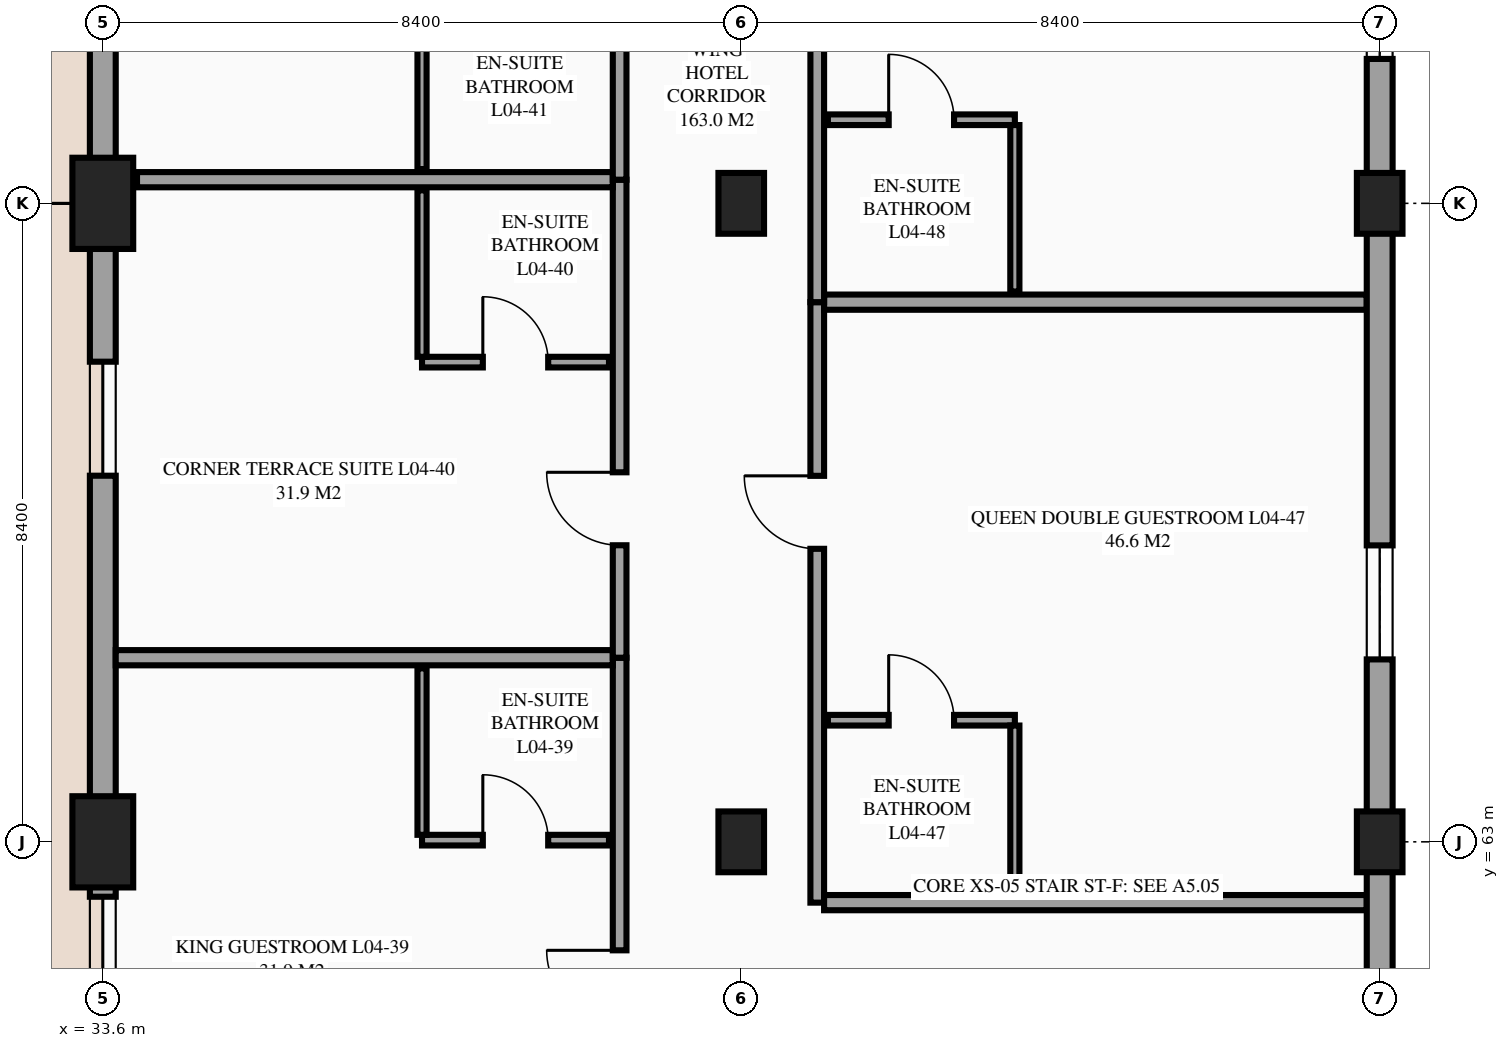
"""IFC4 building model, lengths in metres.
Left out: names, types, materials, properties, quantities, classifications, styles, units other than length and angle.
Written with IfcOpenShell. Run it as: python <this file> out.ifc"""

import sys

from ifc_helpers import new_model, si_unit, direction, frame, frame_2d, origin, origin_2d, place, context, subcontext, project, spatial, rectangle, extrude, element, fill, save


model = new_model("IFC4")
c1 = context("Model", 3, precision=1e-05, world=origin(), true_north=direction((0.0, 1.0)))
c2 = subcontext(c1, "Body", "Model", "MODEL_VIEW")
j1 = project(units=[si_unit("LENGTHUNIT", "METRE"), si_unit("PLANEANGLEUNIT", "RADIAN")], contexts=[c1])
p1 = place(None, origin())
s1 = spatial("IfcSite", under=j1, at=p1, CompositionType="ELEMENT")
p2 = place(p1, origin())
s2 = spatial("IfcBuilding", under=s1, at=p2, CompositionType="ELEMENT")
p3 = place(p2, frame((0.0, 0.0, 18.3)))
s3 = spatial("IfcBuildingStorey", under=s2, at=p3, CompositionType="ELEMENT", Elevation=18.3)
for number, where, z_axis, x_axis in (
    (1, (33.6, 63.0, 0.0), (0.0, 0.0, 1.0), (1.0, 0.0, 0.0)),
    (2, (33.6, 71.4, 0.0), (0.0, 0.0, 1.0), (1.0, 0.0, 0.0)),
):
    element("IfcColumn", number, at=place(p3, frame(where, z_axis=z_axis, x_axis=x_axis)), inside=s3, PredefinedType="COLUMN", context=c2, shape_type="SweptSolid", body=[
        extrude(rectangle(XDim=0.8, YDim=1.2, at=origin_2d()), origin(), (0.0, 0.0, 1.0), 3.6),
    ])
for number, where, z_axis, x_axis in (
    (3, (42.0, 63.0, 0.0), (0.0, 0.0, 1.0), (1.0, 0.0, 0.0)),
    (4, (42.0, 71.4, 0.0), (0.0, 0.0, 1.0), (1.0, 0.0, 0.0)),
    (5, (50.4, 63.0, 0.0), (0.0, 0.0, 1.0), (1.0, 0.0, 0.0)),
    (6, (50.4, 71.4, 0.0), (0.0, 0.0, 1.0), (1.0, 0.0, 0.0)),
):
    element("IfcColumn", number, at=place(p3, frame(where, z_axis=z_axis, x_axis=x_axis)), inside=s3, PredefinedType="COLUMN", context=c2, shape_type="SweptSolid", body=[
        extrude(rectangle(XDim=0.6, YDim=0.8, at=origin_2d()), origin(), (0.0, 0.0, 1.0), 3.6),
    ])
p4 = place(p3, frame((50.4, 71.4, 0.0), z_axis=(0.0, 0.0, 1.0), x_axis=(0.0, 1.0, 0.0)))
e7 = element("IfcWall", 7, at=p4, inside=s3, PredefinedType="STANDARD", context=c2, shape_type="SweptSolid", body=[
    extrude(rectangle(XDim=8.4, YDim=0.34, at=frame_2d((4.2, 0.0))), origin(), (0.0, 0.0, 1.0), 3.133),
])
p5 = place(p4, frame((1.9, 0.0, 0.85)))
e8 = element("IfcOpeningElement", 8, at=p5, cuts=e7, PredefinedType="OPENING", context=c2, shape_type="SweptSolid", body=[
    extrude(rectangle(XDim=1.5, YDim=1.5, at=frame_2d((0.75, 0.75))), frame((0.0, 0.18, 0.0), z_axis=(0.0, -1.0, 0.0), x_axis=(1.0, 0.0, 0.0)), (0.0, 0.0, 1.0), 0.36),
])
p6 = place(p3, frame((33.6, 79.8, 0.0), z_axis=(0.0, 0.0, 1.0), x_axis=(0.0, -1.0, 0.0)))
e9 = element("IfcWall", 9, at=p6, inside=s3, PredefinedType="STANDARD", context=c2, shape_type="SweptSolid", body=[
    extrude(rectangle(XDim=16.8, YDim=0.34, at=frame_2d((8.4, 0.0))), origin(), (0.0, 0.0, 1.0), 2.53),
])
p7 = place(p6, frame((10.483, 0.0, 0.85)))
e10 = element("IfcOpeningElement", 10, at=p7, cuts=e9, PredefinedType="OPENING", context=c2, shape_type="SweptSolid", body=[
    extrude(rectangle(XDim=1.5, YDim=1.5, at=frame_2d((0.75, 0.75))), frame((0.0, 0.18, 0.0), z_axis=(0.0, -1.0, 0.0), x_axis=(1.0, 0.0, 0.0)), (0.0, 0.0, 1.0), 0.36),
])
p8 = place(p6, frame((4.344, 0.0, 0.85)))
e11 = element("IfcOpeningElement", 11, at=p8, cuts=e9, PredefinedType="OPENING", context=c2, shape_type="SweptSolid", body=[
    extrude(rectangle(XDim=1.2, YDim=1.5, at=frame_2d((0.6, 0.75))), frame((0.0, 0.18, 0.0), z_axis=(0.0, -1.0, 0.0), x_axis=(1.0, 0.0, 0.0)), (0.0, 0.0, 1.0), 0.36),
])
p9 = place(p3, frame((40.4, 59.133, 0.0), z_axis=(0.0, 0.0, 1.0), x_axis=(0.0, 1.0, 0.0)))
e12 = element("IfcWall", 12, at=p9, inside=s3, PredefinedType="PARTITIONING", context=c2, shape_type="SweptSolid", body=[
    extrude(rectangle(XDim=6.289, YDim=0.18, at=frame_2d((3.145, 0.0))), origin(), (0.0, 0.0, 1.0), 3.375),
])
p10 = place(p9, frame((1.479, 0.0, 0.0)))
e13 = element("IfcOpeningElement", 13, at=p10, cuts=e12, PredefinedType="OPENING", context=c2, shape_type="SweptSolid", body=[
    extrude(rectangle(XDim=0.96, YDim=2.15, at=frame_2d((0.48, 1.075))), frame((0.0, 0.1, 0.0), z_axis=(0.0, -1.0, 0.0), x_axis=(1.0, 0.0, 0.0)), (0.0, 0.0, 1.0), 0.2),
])
p11 = place(p3, frame((33.77, 65.422, 0.0), z_axis=(0.0, 0.0, 1.0), x_axis=(1.0, 0.0, 0.0)))
e14 = element("IfcWall", 14, at=p11, inside=s3, PredefinedType="PARTITIONING", context=c2, shape_type="SweptSolid", body=[
    extrude(rectangle(XDim=6.54, YDim=0.2, at=frame_2d((3.27, 0.0))), origin(), (0.0, 0.0, 1.0), 3.375),
])
p12 = place(p3, frame((37.8, 63.022, 0.0), z_axis=(0.0, 0.0, 1.0), x_axis=(1.0, 0.0, 0.0)))
e15 = element("IfcWall", 15, at=p12, inside=s3, PredefinedType="PARTITIONING", context=c2, shape_type="SweptSolid", body=[
    extrude(rectangle(XDim=2.46, YDim=0.14, at=frame_2d((1.23, 0.0))), origin(), (0.0, 0.0, 1.0), 2.63),
])
p13 = place(p12, frame((0.8, 0.0, 0.0)))
e16 = element("IfcOpeningElement", 16, at=p13, cuts=e15, PredefinedType="OPENING", context=c2, shape_type="SweptSolid", body=[
    extrude(rectangle(XDim=0.86, YDim=2.1, at=frame_2d((0.43, 1.05))), frame((0.0, 0.08, 0.0), z_axis=(0.0, -1.0, 0.0), x_axis=(1.0, 0.0, 0.0)), (0.0, 0.0, 1.0), 0.16),
])
p14 = place(p3, frame((37.8, 63.092, 0.0), z_axis=(0.0, 0.0, 1.0), x_axis=(0.0, 1.0, 0.0)))
e17 = element("IfcWall", 17, at=p14, inside=s3, PredefinedType="PARTITIONING", context=c2, shape_type="SweptSolid", body=[
    extrude(rectangle(XDim=2.19, YDim=0.12, at=frame_2d((1.095, 0.0))), origin(), (0.0, 0.0, 1.0), 3.375),
])
p15 = place(p3, frame((40.4, 65.422, 0.0), z_axis=(0.0, 0.0, 1.0), x_axis=(0.0, 1.0, 0.0)))
e18 = element("IfcWall", 18, at=p15, inside=s3, PredefinedType="PARTITIONING", context=c2, shape_type="SweptSolid", body=[
    extrude(rectangle(XDim=6.289, YDim=0.18, at=frame_2d((3.145, 0.0))), origin(), (0.0, 0.0, 1.0), 3.375),
])
p16 = place(p15, frame((1.479, 0.0, 0.0)))
e19 = element("IfcOpeningElement", 19, at=p16, cuts=e18, PredefinedType="OPENING", context=c2, shape_type="SweptSolid", body=[
    extrude(rectangle(XDim=0.96, YDim=2.15, at=frame_2d((0.48, 1.075))), frame((0.0, 0.1, 0.0), z_axis=(0.0, -1.0, 0.0), x_axis=(1.0, 0.0, 0.0)), (0.0, 0.0, 1.0), 0.2),
])
p17 = place(p3, frame((34.05, 71.711, 0.0), z_axis=(0.0, 0.0, 1.0), x_axis=(1.0, 0.0, 0.0)))
e20 = element("IfcWall", 20, at=p17, inside=s3, PredefinedType="PARTITIONING", context=c2, shape_type="SweptSolid", body=[
    extrude(rectangle(XDim=6.26, YDim=0.2, at=frame_2d((3.13, 0.0))), origin(), (0.0, 0.0, 1.0), 3.375),
])
p18 = place(p3, frame((37.8, 69.311, 0.0), z_axis=(0.0, 0.0, 1.0), x_axis=(1.0, 0.0, 0.0)))
e21 = element("IfcWall", 21, at=p18, inside=s3, PredefinedType="PARTITIONING", context=c2, shape_type="SweptSolid", body=[
    extrude(rectangle(XDim=2.46, YDim=0.14, at=frame_2d((1.23, 0.0))), origin(), (0.0, 0.0, 1.0), 3.375),
])
p19 = place(p18, frame((0.8, 0.0, 0.0)))
e22 = element("IfcOpeningElement", 22, at=p19, cuts=e21, PredefinedType="OPENING", context=c2, shape_type="SweptSolid", body=[
    extrude(rectangle(XDim=0.86, YDim=2.1, at=frame_2d((0.43, 1.05))), frame((0.0, 0.08, 0.0), z_axis=(0.0, -1.0, 0.0), x_axis=(1.0, 0.0, 0.0)), (0.0, 0.0, 1.0), 0.16),
])
p20 = place(p3, frame((37.8, 69.381, 0.0), z_axis=(0.0, 0.0, 1.0), x_axis=(0.0, 1.0, 0.0)))
e23 = element("IfcWall", 23, at=p20, inside=s3, PredefinedType="PARTITIONING", context=c2, shape_type="SweptSolid", body=[
    extrude(rectangle(XDim=2.19, YDim=0.12, at=frame_2d((1.095, 0.0))), origin(), (0.0, 0.0, 1.0), 3.375),
])
p21 = place(p3, frame((40.4, 71.711, 0.0), z_axis=(0.0, 0.0, 1.0), x_axis=(0.0, 1.0, 0.0)))
e24 = element("IfcWall", 24, at=p21, inside=s3, PredefinedType="PARTITIONING", context=c2, shape_type="SweptSolid", body=[
    extrude(rectangle(XDim=6.289, YDim=0.18, at=frame_2d((3.145, 0.0))), origin(), (0.0, 0.0, 1.0), 3.375),
])
p22 = place(p21, frame((3.849, 0.0, 0.0)))
e25 = element("IfcOpeningElement", 25, at=p22, cuts=e24, PredefinedType="OPENING", context=c2, shape_type="SweptSolid", body=[
    extrude(rectangle(XDim=0.96, YDim=2.15, at=frame_2d((0.48, 1.075))), frame((0.0, 0.1, 0.0), z_axis=(0.0, -1.0, 0.0), x_axis=(1.0, 0.0, 0.0)), (0.0, 0.0, 1.0), 0.2),
])
p23 = place(p3, frame((37.8, 71.851, 0.0), z_axis=(0.0, 0.0, 1.0), x_axis=(0.0, 1.0, 0.0)))
e26 = element("IfcWall", 26, at=p23, inside=s3, PredefinedType="PARTITIONING", context=c2, shape_type="SweptSolid", body=[
    extrude(rectangle(XDim=2.19, YDim=0.12, at=frame_2d((1.095, 0.0))), origin(), (0.0, 0.0, 1.0), 3.375),
])
p24 = place(p3, frame((43.0, 62.2, 0.0), z_axis=(0.0, 0.0, 1.0), x_axis=(0.0, 1.0, 0.0)))
e27 = element("IfcWall", 27, at=p24, inside=s3, PredefinedType="PARTITIONING", context=c2, shape_type="SweptSolid", body=[
    extrude(rectangle(XDim=7.9, YDim=0.18, at=frame_2d((3.95, 0.0))), origin(), (0.0, 0.0, 1.0), 3.375),
])
p25 = place(p24, frame((4.655, 0.0, 0.0)))
e28 = element("IfcOpeningElement", 28, at=p25, cuts=e27, PredefinedType="OPENING", context=c2, shape_type="SweptSolid", body=[
    extrude(rectangle(XDim=0.96, YDim=2.15, at=frame_2d((0.48, 1.075))), frame((0.0, 0.1, 0.0), z_axis=(0.0, -1.0, 0.0), x_axis=(1.0, 0.0, 0.0)), (0.0, 0.0, 1.0), 0.2),
])
for number, where, z_axis, x_axis in (
    (29, (43.09, 62.2, 0.0), (0.0, 0.0, 1.0), (1.0, 0.0, 0.0)),
    (30, (43.09, 70.1, 0.0), (0.0, 0.0, 1.0), (1.0, 0.0, 0.0)),
):
    element("IfcWall", number, at=place(p3, frame(where, z_axis=z_axis, x_axis=x_axis)), inside=s3, PredefinedType="PARTITIONING", context=c2, shape_type="SweptSolid", body=[
        extrude(rectangle(XDim=7.14, YDim=0.2, at=frame_2d((3.57, 0.0))), origin(), (0.0, 0.0, 1.0), 3.375),
    ])
p26 = place(p3, frame((43.14, 64.6, 0.0), z_axis=(0.0, 0.0, 1.0), x_axis=(1.0, 0.0, 0.0)))
e31 = element("IfcWall", 31, at=p26, inside=s3, PredefinedType="PARTITIONING", context=c2, shape_type="SweptSolid", body=[
    extrude(rectangle(XDim=2.46, YDim=0.14, at=frame_2d((1.23, 0.0))), origin(), (0.0, 0.0, 1.0), 3.375),
])
p27 = place(p26, frame((0.8, 0.0, 0.0)))
e32 = element("IfcOpeningElement", 32, at=p27, cuts=e31, PredefinedType="OPENING", context=c2, shape_type="SweptSolid", body=[
    extrude(rectangle(XDim=0.86, YDim=2.1, at=frame_2d((0.43, 1.05))), frame((0.0, 0.08, 0.0), z_axis=(0.0, -1.0, 0.0), x_axis=(1.0, 0.0, 0.0)), (0.0, 0.0, 1.0), 0.16),
])
p28 = place(p3, frame((45.6, 62.34, 0.0), z_axis=(0.0, 0.0, 1.0), x_axis=(0.0, 1.0, 0.0)))
e33 = element("IfcWall", 33, at=p28, inside=s3, PredefinedType="PARTITIONING", context=c2, shape_type="SweptSolid", body=[
    extrude(rectangle(XDim=2.19, YDim=0.12, at=frame_2d((1.095, 0.0))), origin(), (0.0, 0.0, 1.0), 3.375),
])
p29 = place(p3, frame((43.0, 70.1, 0.0), z_axis=(0.0, 0.0, 1.0), x_axis=(0.0, 1.0, 0.0)))
e34 = element("IfcWall", 34, at=p29, inside=s3, PredefinedType="PARTITIONING", context=c2, shape_type="SweptSolid", body=[
    extrude(rectangle(XDim=7.9, YDim=0.18, at=frame_2d((3.95, 0.0))), origin(), (0.0, 0.0, 1.0), 3.375),
])
p30 = place(p29, frame((4.655, 0.0, 0.0)))
e35 = element("IfcOpeningElement", 35, at=p30, cuts=e34, PredefinedType="OPENING", context=c2, shape_type="SweptSolid", body=[
    extrude(rectangle(XDim=0.96, YDim=2.15, at=frame_2d((0.48, 1.075))), frame((0.0, 0.1, 0.0), z_axis=(0.0, -1.0, 0.0), x_axis=(1.0, 0.0, 0.0)), (0.0, 0.0, 1.0), 0.2),
])
p31 = place(p3, frame((43.14, 72.5, 0.0), z_axis=(0.0, 0.0, 1.0), x_axis=(1.0, 0.0, 0.0)))
e36 = element("IfcWall", 36, at=p31, inside=s3, PredefinedType="PARTITIONING", context=c2, shape_type="SweptSolid", body=[
    extrude(rectangle(XDim=2.46, YDim=0.14, at=frame_2d((1.23, 0.0))), origin(), (0.0, 0.0, 1.0), 3.375),
])
p32 = place(p31, frame((0.8, 0.0, 0.0)))
e37 = element("IfcOpeningElement", 37, at=p32, cuts=e36, PredefinedType="OPENING", context=c2, shape_type="SweptSolid", body=[
    extrude(rectangle(XDim=0.86, YDim=2.1, at=frame_2d((0.43, 1.05))), frame((0.0, 0.08, 0.0), z_axis=(0.0, -1.0, 0.0), x_axis=(1.0, 0.0, 0.0)), (0.0, 0.0, 1.0), 0.16),
])
p33 = place(p3, frame((45.6, 70.24, 0.0), z_axis=(0.0, 0.0, 1.0), x_axis=(0.0, 1.0, 0.0)))
e38 = element("IfcWall", 38, at=p33, inside=s3, PredefinedType="PARTITIONING", context=c2, shape_type="SweptSolid", body=[
    extrude(rectangle(XDim=2.19, YDim=0.12, at=frame_2d((1.095, 0.0))), origin(), (0.0, 0.0, 1.0), 3.375),
])
p34 = place(p3, frame((50.4, 60.8, 0.0), z_axis=(0.0, 0.0, 1.0), x_axis=(0.0, 1.0, 0.0)))
e39 = element("IfcWall", 39, at=p34, inside=s3, PredefinedType="STANDARD", context=c2, shape_type="SweptSolid", body=[
    extrude(rectangle(XDim=2.2, YDim=0.34, at=frame_2d((1.1, 0.0))), origin(), (0.0, 0.0, 1.0), 2.43),
])
p35 = place(p3, frame((50.4, 63.0, 0.0), z_axis=(0.0, 0.0, 1.0), x_axis=(0.0, 1.0, 0.0)))
e40 = element("IfcWall", 40, at=p35, inside=s3, PredefinedType="STANDARD", context=c2, shape_type="SweptSolid", body=[
    extrude(rectangle(XDim=8.4, YDim=0.34, at=frame_2d((4.2, 0.0))), origin(), (0.0, 0.0, 1.0), 2.53),
])
p36 = place(p35, frame((2.4, 0.0, 0.85)))
e41 = element("IfcOpeningElement", 41, at=p36, cuts=e40, PredefinedType="OPENING", context=c2, shape_type="SweptSolid", body=[
    extrude(rectangle(XDim=1.5, YDim=1.5, at=frame_2d((0.75, 0.75))), frame((0.0, 0.18, 0.0), z_axis=(0.0, -1.0, 0.0), x_axis=(1.0, 0.0, 0.0)), (0.0, 0.0, 1.0), 0.36),
])
p37 = place(p3, frame((33.6, 63.0, 0.0), z_axis=(0.0, 0.0, 1.0), x_axis=(0.0, -1.0, 0.0)))
e42 = element("IfcWall", 42, at=p37, inside=s3, PredefinedType="STANDARD", context=c2, shape_type="SweptSolid", body=[
    extrude(rectangle(XDim=8.4, YDim=0.34, at=frame_2d((4.2, 0.0))), origin(), (0.0, 0.0, 1.0), 3.133),
])
p38 = place(p37, frame((6.261, 0.0, 0.85)))
e43 = element("IfcOpeningElement", 43, at=p38, cuts=e42, PredefinedType="OPENING", context=c2, shape_type="SweptSolid", body=[
    extrude(rectangle(XDim=1.5, YDim=1.5, at=frame_2d((0.75, 0.75))), frame((0.0, 0.18, 0.0), z_axis=(0.0, -1.0, 0.0), x_axis=(1.0, 0.0, 0.0)), (0.0, 0.0, 1.0), 0.36),
])
p39 = place(p37, frame((0.722, 0.0, 0.85)))
e44 = element("IfcOpeningElement", 44, at=p39, cuts=e42, PredefinedType="OPENING", context=c2, shape_type="SweptSolid", body=[
    extrude(rectangle(XDim=1.5, YDim=1.5, at=frame_2d((0.75, 0.75))), frame((0.0, 0.18, 0.0), z_axis=(0.0, -1.0, 0.0), x_axis=(1.0, 0.0, 0.0)), (0.0, 0.0, 1.0), 0.36),
])
p40 = place(p39, origin())
e45 = element("IfcWindow", 45, at=p40, inside=s3, PartitioningType="SINGLE_PANEL", PredefinedType="WINDOW", context=c2, shape_type="SweptSolid", body=[
    extrude(rectangle(XDim=1.5, YDim=1.5, at=frame_2d((0.75, 0.75))), frame((0.0, 0.03, 0.0), z_axis=(0.0, -1.0, 0.0), x_axis=(1.0, 0.0, 0.0)), (0.0, 0.0, 1.0), 0.06),
])
fill(e44, e45)
p41 = place(p7, origin())
e46 = element("IfcWindow", 46, at=p41, inside=s3, PartitioningType="SINGLE_PANEL", PredefinedType="WINDOW", context=c2, shape_type="SweptSolid", body=[
    extrude(rectangle(XDim=1.5, YDim=1.5, at=frame_2d((0.75, 0.75))), frame((0.0, 0.03, 0.0), z_axis=(0.0, -1.0, 0.0), x_axis=(1.0, 0.0, 0.0)), (0.0, 0.0, 1.0), 0.06),
])
fill(e10, e46)
p42 = place(p36, origin())
e47 = element("IfcWindow", 47, at=p42, inside=s3, PartitioningType="SINGLE_PANEL", PredefinedType="WINDOW", context=c2, shape_type="SweptSolid", body=[
    extrude(rectangle(XDim=1.5, YDim=1.5, at=frame_2d((0.75, 0.75))), frame((0.0, 0.03, 0.0), z_axis=(0.0, -1.0, 0.0), x_axis=(1.0, 0.0, 0.0)), (0.0, 0.0, 1.0), 0.06),
])
fill(e41, e47)
p43 = place(p5, origin())
e48 = element("IfcWindow", 48, at=p43, inside=s3, PartitioningType="SINGLE_PANEL", PredefinedType="WINDOW", context=c2, shape_type="SweptSolid", body=[
    extrude(rectangle(XDim=1.5, YDim=1.5, at=frame_2d((0.75, 0.75))), frame((0.0, 0.03, 0.0), z_axis=(0.0, -1.0, 0.0), x_axis=(1.0, 0.0, 0.0)), (0.0, 0.0, 1.0), 0.06),
])
fill(e8, e48)
p44 = place(p10, origin())
e49 = element("IfcDoor", 49, at=p44, inside=s3, OperationType="SINGLE_SWING_RIGHT", PredefinedType="DOOR", context=c2, shape_type="SweptSolid", body=[
    extrude(rectangle(XDim=0.96, YDim=2.15, at=frame_2d((0.48, 1.075))), frame((0.0, 0.025, 0.0), z_axis=(0.0, -1.0, 0.0), x_axis=(1.0, 0.0, 0.0)), (0.0, 0.0, 1.0), 0.05),
])
fill(e13, e49)
p45 = place(p13, origin())
e50 = element("IfcDoor", 50, at=p45, inside=s3, OperationType="SINGLE_SWING_LEFT", PredefinedType="DOOR", context=c2, shape_type="SweptSolid", body=[
    extrude(rectangle(XDim=0.86, YDim=2.1, at=frame_2d((0.43, 1.05))), frame((0.0, 0.025, 0.0), z_axis=(0.0, -1.0, 0.0), x_axis=(1.0, 0.0, 0.0)), (0.0, 0.0, 1.0), 0.05),
])
fill(e16, e50)
p46 = place(p16, origin())
e51 = element("IfcDoor", 51, at=p46, inside=s3, OperationType="SINGLE_SWING_RIGHT", PredefinedType="DOOR", context=c2, shape_type="SweptSolid", body=[
    extrude(rectangle(XDim=0.96, YDim=2.15, at=frame_2d((0.48, 1.075))), frame((0.0, 0.025, 0.0), z_axis=(0.0, -1.0, 0.0), x_axis=(1.0, 0.0, 0.0)), (0.0, 0.0, 1.0), 0.05),
])
fill(e19, e51)
p47 = place(p19, origin())
e52 = element("IfcDoor", 52, at=p47, inside=s3, OperationType="SINGLE_SWING_LEFT", PredefinedType="DOOR", context=c2, shape_type="SweptSolid", body=[
    extrude(rectangle(XDim=0.86, YDim=2.1, at=frame_2d((0.43, 1.05))), frame((0.0, 0.025, 0.0), z_axis=(0.0, -1.0, 0.0), x_axis=(1.0, 0.0, 0.0)), (0.0, 0.0, 1.0), 0.05),
])
fill(e22, e52)
p48 = place(p25, origin())
e53 = element("IfcDoor", 53, at=p48, inside=s3, OperationType="SINGLE_SWING_RIGHT", PredefinedType="DOOR", context=c2, shape_type="SweptSolid", body=[
    extrude(rectangle(XDim=0.96, YDim=2.15, at=frame_2d((0.48, 1.075))), frame((0.0, 0.025, 0.0), z_axis=(0.0, -1.0, 0.0), x_axis=(1.0, 0.0, 0.0)), (0.0, 0.0, 1.0), 0.05),
])
fill(e28, e53)
p49 = place(p27, origin())
e54 = element("IfcDoor", 54, at=p49, inside=s3, OperationType="SINGLE_SWING_LEFT", PredefinedType="DOOR", context=c2, shape_type="SweptSolid", body=[
    extrude(rectangle(XDim=0.86, YDim=2.1, at=frame_2d((0.43, 1.05))), frame((0.0, 0.025, 0.0), z_axis=(0.0, -1.0, 0.0), x_axis=(1.0, 0.0, 0.0)), (0.0, 0.0, 1.0), 0.05),
])
fill(e32, e54)
p50 = place(p32, origin())
e55 = element("IfcDoor", 55, at=p50, inside=s3, OperationType="SINGLE_SWING_LEFT", PredefinedType="DOOR", context=c2, shape_type="SweptSolid", body=[
    extrude(rectangle(XDim=0.86, YDim=2.1, at=frame_2d((0.43, 1.05))), frame((0.0, 0.025, 0.0), z_axis=(0.0, -1.0, 0.0), x_axis=(1.0, 0.0, 0.0)), (0.0, 0.0, 1.0), 0.05),
])
fill(e37, e55)
save(model, sys.argv[1])
